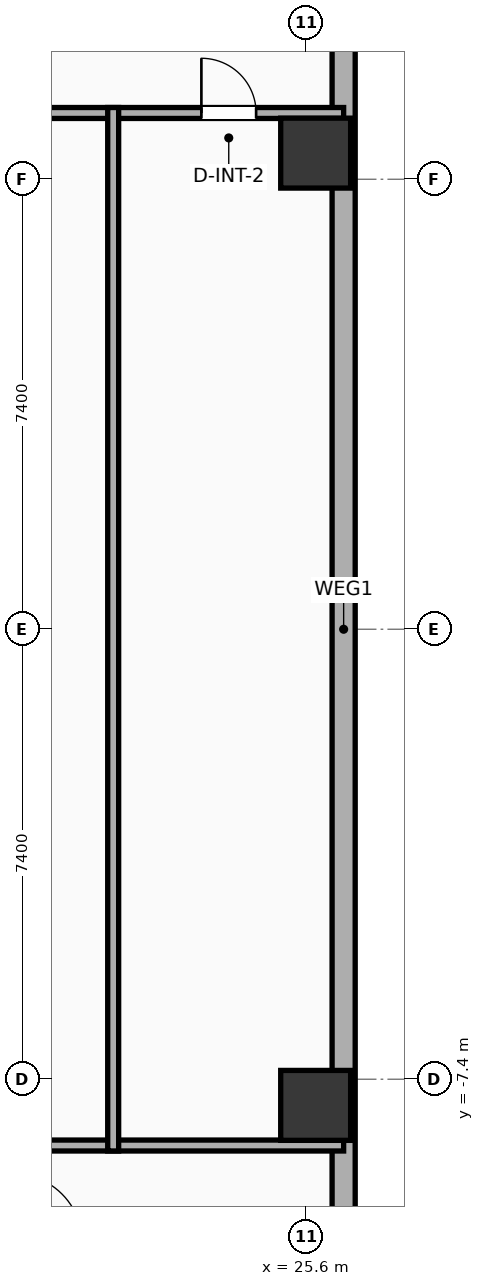
"""IFC4 building model, lengths in metres.
Left out: names, types, materials, properties, quantities, classifications, styles, units other than length and angle.
Written with IfcOpenShell. Run it as: python <this file> out.ifc"""

import sys

from ifc_helpers import new_model, si_unit, direction, frame, frame_2d, origin, origin_2d, place, context, subcontext, project, spatial, rectangle, hollow_rectangle, extrude, element, fill, save


model = new_model("IFC4")
c1 = context("Model", 3, precision=1e-05, world=origin(), true_north=direction((0.0, 1.0)))
c2 = subcontext(c1, "Body", "Model", "MODEL_VIEW")
j1 = project(units=[si_unit("LENGTHUNIT", "METRE"), si_unit("PLANEANGLEUNIT", "RADIAN")], contexts=[c1])
p1 = place(None, origin())
s1 = spatial("IfcSite", under=j1, at=p1, CompositionType="ELEMENT")
p2 = place(p1, origin())
s2 = spatial("IfcBuilding", under=s1, at=p2, CompositionType="ELEMENT")
p3 = place(p2, frame((0.0, 0.0, 45.5)))
s3 = spatial("IfcBuildingStorey", under=s2, at=p3, CompositionType="ELEMENT", Elevation=45.5)
for number, where, z_axis, x_axis in (
    (1, (25.75, -7.83, 0.0), (0.0, 0.0, 1.0), (1.0, 0.0, 0.0)),
    (2, (25.75, 7.83, 0.0), (0.0, 0.0, 1.0), (1.0, 0.0, 0.0)),
):
    element("IfcColumn", number, at=place(p3, frame(where, z_axis=z_axis, x_axis=x_axis)), inside=s3, PredefinedType="COLUMN", context=c2, shape_type="SweptSolid", body=[
        extrude(hollow_rectangle(XDim=1.15, YDim=1.15, WallThickness=0.04, at=origin_2d()), origin(), (0.0, 0.0, 1.0), 3.9),
    ])
p4 = place(p3, frame((26.21, 18.381, 0.0), z_axis=(0.0, 0.0, 1.0), x_axis=(0.0, -1.0, 0.0)))
e3 = element("IfcWall", 3, at=p4, inside=s3, PredefinedType="ELEMENTEDWALL", context=c2, shape_type="SweptSolid", body=[
    extrude(rectangle(XDim=36.763, YDim=0.38, at=frame_2d((18.381, 0.0))), origin(), (0.0, 0.0, 1.0), 3.65),
])
p5 = place(p3, frame((9.88, 8.49, 0.0), z_axis=(0.0, 0.0, 1.0), x_axis=(1.0, 0.0, 0.0)))
e4 = element("IfcWall", 4, at=p5, inside=s3, PredefinedType="PARTITIONING", context=c2, shape_type="SweptSolid", body=[
    extrude(rectangle(XDim=16.33, YDim=0.18, at=frame_2d((8.165, 0.0))), origin(), (0.0, 0.0, 1.0), 3.65),
])
p6 = place(p5, frame((13.99, 0.0, 0.0)))
e5 = element("IfcOpeningElement", 5, at=p6, cuts=e4, PredefinedType="OPENING", context=c2, shape_type="SweptSolid", body=[
    extrude(rectangle(XDim=0.9, YDim=2.05, at=frame_2d((0.45, 1.025))), frame((0.0, 0.1, 0.0), z_axis=(0.0, -1.0, 0.0), x_axis=(1.0, 0.0, 0.0)), (0.0, 0.0, 1.0), 0.2),
])
p7 = place(p3, frame((9.88, -8.49, 0.0), z_axis=(0.0, 0.0, 1.0), x_axis=(1.0, 0.0, 0.0)))
e6 = element("IfcWall", 6, at=p7, inside=s3, PredefinedType="PARTITIONING", context=c2, shape_type="SweptSolid", body=[
    extrude(rectangle(XDim=16.33, YDim=0.18, at=frame_2d((8.165, 0.0))), origin(), (0.0, 0.0, 1.0), 3.65),
])
p8 = place(p3, frame((22.42, -8.58, 0.0), z_axis=(0.0, 0.0, 1.0), x_axis=(0.0, 1.0, 0.0)))
e7 = element("IfcWall", 7, at=p8, inside=s3, PredefinedType="PARTITIONING", context=c2, shape_type="SweptSolid", body=[
    extrude(rectangle(XDim=17.16, YDim=0.18, at=frame_2d((8.58, 0.0))), origin(), (0.0, 0.0, 1.0), 3.65),
])
p9 = place(p6, origin())
e8 = element("IfcDoor", 8, at=p9, inside=s3, OperationType="SINGLE_SWING_LEFT", PredefinedType="DOOR", context=c2, shape_type="SweptSolid", body=[
    extrude(rectangle(XDim=0.9, YDim=2.05, at=frame_2d((0.45, 1.025))), frame((0.0, 0.025, 0.0), z_axis=(0.0, -1.0, 0.0), x_axis=(1.0, 0.0, 0.0)), (0.0, 0.0, 1.0), 0.05),
])
fill(e5, e8)
save(model, sys.argv[1])
